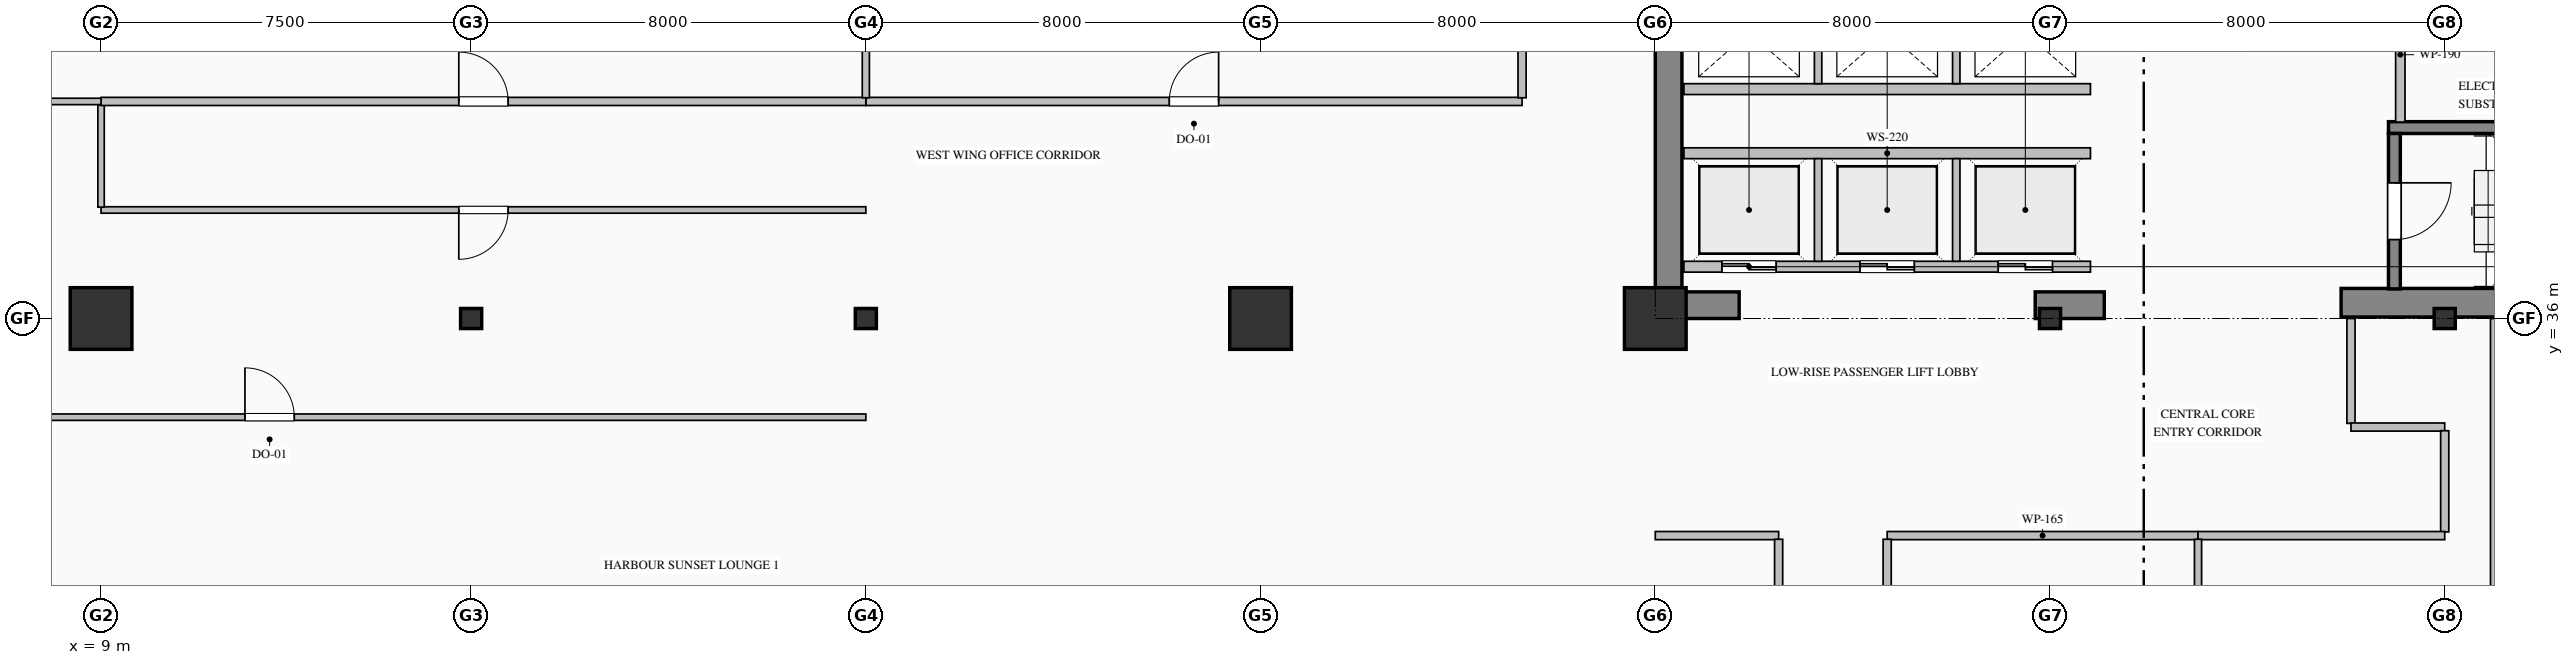
"""IFC4 building model, lengths in metres.
Left out: names, types, materials, properties, quantities, classifications, styles, units other than length and angle.
Written with IfcOpenShell. Run it as: python <this file> out.ifc"""

import sys

from ifc_helpers import new_model, si_unit, direction, frame, frame_2d, origin, origin_2d, place, context, subcontext, project, spatial, rectangle, hollow_rectangle, i_section, extrude, element, fill, save


model = new_model("IFC4")
c1 = context("Model", 3, precision=1e-05, world=origin(), true_north=direction((0.0, 1.0)))
c2 = subcontext(c1, "Body", "Model", "MODEL_VIEW")
j1 = project(units=[si_unit("LENGTHUNIT", "METRE"), si_unit("PLANEANGLEUNIT", "RADIAN")], contexts=[c1])
p1 = place(None, origin())
s1 = spatial("IfcSite", under=j1, at=p1, CompositionType="ELEMENT")
p2 = place(p1, origin())
s2 = spatial("IfcBuilding", under=s1, at=p2, CompositionType="ELEMENT")
p3 = place(p2, frame((0.0, 0.0, 68.2)))
s3 = spatial("IfcBuildingStorey", under=s2, at=p3, CompositionType="ELEMENT", Elevation=68.2)
p4 = place(p3, frame((40.77, 36.54, 0.0), z_axis=(0.0, 0.0, 1.0), x_axis=(0.0, 1.0, 0.0)))
e1 = element("IfcWall", 1, at=p4, inside=s3, PredefinedType="SHEAR", context=c2, shape_type="SweptSolid", body=[
    extrude(rectangle(XDim=7.86, YDim=0.54, at=frame_2d((3.93, 0.0))), origin(), (0.0, 0.0, 1.0), 3.75),
])
p5 = place(p3, frame((40.5, 36.27, 0.0), z_axis=(0.0, 0.0, 1.0), x_axis=(1.0, 0.0, 0.0)))
e2 = element("IfcWall", 2, at=p5, inside=s3, PredefinedType="SHEAR", context=c2, shape_type="SweptSolid", body=[
    extrude(rectangle(XDim=1.7, YDim=0.54, at=frame_2d((0.85, 0.0))), origin(), (0.0, 0.0, 1.0), 3.75),
])
p6 = place(p3, frame((48.2, 36.27, 0.0), z_axis=(0.0, 0.0, 1.0), x_axis=(1.0, 0.0, 0.0)))
e3 = element("IfcWall", 3, at=p6, inside=s3, PredefinedType="SHEAR", context=c2, shape_type="SweptSolid", body=[
    extrude(rectangle(XDim=1.4, YDim=0.54, at=frame_2d((0.7, 0.0))), origin(), (0.0, 0.0, 1.0), 3.75),
])
p7 = place(p3, frame((54.4, 36.32, 0.0), z_axis=(0.0, 0.0, 1.0), x_axis=(1.0, 0.0, 0.0)))
e4 = element("IfcWall", 4, at=p7, inside=s3, PredefinedType="SHEAR", context=c2, shape_type="SweptSolid", body=[
    extrude(rectangle(XDim=9.6, YDim=0.58, at=frame_2d((4.8, 0.0))), origin(), (0.0, 0.0, 1.0), 4.0),
])
p8 = place(p3, frame((9.0, 36.0, 0.0), z_axis=(0.0, 0.0, 1.0), x_axis=(1.0, 0.0, 0.0)))
e5 = element("IfcColumn", 5, at=p8, inside=s3, PredefinedType="COLUMN", context=c2, shape_type="SweptSolid", body=[
    extrude(hollow_rectangle(XDim=1.25, YDim=1.25, WallThickness=0.045, at=origin_2d()), origin(), (0.0, 0.0, 1.0), 4.0),
])
for number, where, z_axis, x_axis in (
    (6, (16.5, 36.0, 0.0), (0.0, 0.0, 1.0), (1.0, 0.0, 0.0)),
    (7, (24.5, 36.0, 0.0), (0.0, 0.0, 1.0), (1.0, 0.0, 0.0)),
):
    element("IfcColumn", number, at=place(p3, frame(where, z_axis=z_axis, x_axis=x_axis)), inside=s3, PredefinedType="COLUMN", context=c2, shape_type="SweptSolid", body=[
        extrude(i_section(OverallWidth=0.407, OverallDepth=0.428, WebThickness=0.02, FlangeThickness=0.035, FilletRadius=0.022, at=origin_2d()), origin(), (0.0, 0.0, 1.0), 4.0),
    ])
for number, where, z_axis, x_axis in (
    (8, (32.5, 36.0, 0.0), (0.0, 0.0, 1.0), (1.0, 0.0, 0.0)),
    (9, (40.5, 36.0, 0.0), (0.0, 0.0, 1.0), (1.0, 0.0, 0.0)),
):
    element("IfcColumn", number, at=place(p3, frame(where, z_axis=z_axis, x_axis=x_axis)), inside=s3, PredefinedType="COLUMN", context=c2, shape_type="SweptSolid", body=[
        extrude(hollow_rectangle(XDim=1.25, YDim=1.25, WallThickness=0.045, at=origin_2d()), origin(), (0.0, 0.0, 1.0), 4.0),
    ])
for number, where, z_axis, x_axis in (
    (10, (48.5, 36.0, 0.0), (0.0, 0.0, 1.0), (1.0, 0.0, 0.0)),
    (11, (56.5, 36.0, 0.0), (0.0, 0.0, 1.0), (1.0, 0.0, 0.0)),
):
    element("IfcColumn", number, at=place(p3, frame(where, z_axis=z_axis, x_axis=x_axis)), inside=s3, PredefinedType="COLUMN", context=c2, shape_type="SweptSolid", body=[
        extrude(i_section(OverallWidth=0.407, OverallDepth=0.428, WebThickness=0.02, FlangeThickness=0.035, FilletRadius=0.022, at=origin_2d()), origin(), (0.0, 0.0, 1.0), 4.0),
    ])
p9 = place(p3, frame((55.36, 39.87, 0.0), z_axis=(0.0, 0.0, 1.0), x_axis=(1.0, 0.0, 0.0)))
e12 = element("IfcWall", 12, at=p9, inside=s3, PredefinedType="SOLIDWALL", context=c2, shape_type="SweptSolid", body=[
    extrude(rectangle(XDim=8.08, YDim=0.24, at=frame_2d((4.04, 0.0))), origin(), (0.0, 0.0, 1.0), 4.0),
])
p10 = place(p3, frame((55.48, 39.75, 0.0), z_axis=(0.0, 0.0, 1.0), x_axis=(0.0, -1.0, 0.0)))
e13 = element("IfcWall", 13, at=p10, inside=s3, PredefinedType="SOLIDWALL", context=c2, shape_type="SweptSolid", body=[
    extrude(rectangle(XDim=3.15, YDim=0.24, at=frame_2d((1.575, 0.0))), origin(), (0.0, 0.0, 1.0), 4.0),
])
p11 = place(p10, frame((1.0, 0.0, 0.0)))
e14 = element("IfcOpeningElement", 14, at=p11, cuts=e13, PredefinedType="OPENING", context=c2, shape_type="SweptSolid", body=[
    extrude(rectangle(XDim=1.15, YDim=2.2, at=frame_2d((0.575, 1.1))), frame((0.0, 0.13, 0.0), z_axis=(0.0, -1.0, 0.0), x_axis=(1.0, 0.0, 0.0)), (0.0, 0.0, 1.0), 0.26),
])
p12 = place(p3, frame((49.32, 37.05, 0.0), z_axis=(0.0, 0.0, 1.0), x_axis=(-1.0, 0.0, 0.0)))
e15 = element("IfcWall", 15, at=p12, inside=s3, PredefinedType="PARTITIONING", context=c2, shape_type="SweptSolid", body=[
    extrude(rectangle(XDim=8.24, YDim=0.22, at=frame_2d((4.12, 0.0))), origin(), (0.0, 0.0, 1.0), 3.75),
])
p13 = place(p12, frame((6.37, 0.0, 0.0)))
e16 = element("IfcOpeningElement", 16, at=p13, cuts=e15, PredefinedType="OPENING", context=c2, shape_type="SweptSolid", body=[
    extrude(rectangle(XDim=1.1, YDim=2.2, at=frame_2d((0.55, 1.1))), frame((0.0, 0.12, 0.0), z_axis=(0.0, -1.0, 0.0), x_axis=(1.0, 0.0, 0.0)), (0.0, 0.0, 1.0), 0.24),
])
p14 = place(p12, frame((3.57, 0.0, 0.0)))
e17 = element("IfcOpeningElement", 17, at=p14, cuts=e15, PredefinedType="OPENING", context=c2, shape_type="SweptSolid", body=[
    extrude(rectangle(XDim=1.1, YDim=2.2, at=frame_2d((0.55, 1.1))), frame((0.0, 0.12, 0.0), z_axis=(0.0, -1.0, 0.0), x_axis=(1.0, 0.0, 0.0)), (0.0, 0.0, 1.0), 0.24),
])
p15 = place(p12, frame((0.77, 0.0, 0.0)))
e18 = element("IfcOpeningElement", 18, at=p15, cuts=e15, PredefinedType="OPENING", context=c2, shape_type="SweptSolid", body=[
    extrude(rectangle(XDim=1.1, YDim=2.2, at=frame_2d((0.55, 1.1))), frame((0.0, 0.12, 0.0), z_axis=(0.0, -1.0, 0.0), x_axis=(1.0, 0.0, 0.0)), (0.0, 0.0, 1.0), 0.24),
])
p16 = place(p3, frame((41.08, 39.35, 0.0), z_axis=(0.0, 0.0, 1.0), x_axis=(1.0, 0.0, 0.0)))
e19 = element("IfcWall", 19, at=p16, inside=s3, PredefinedType="PARTITIONING", context=c2, shape_type="SweptSolid", body=[
    extrude(rectangle(XDim=8.24, YDim=0.22, at=frame_2d((4.12, 0.0))), origin(), (0.0, 0.0, 1.0), 3.75),
])
for number, where, z_axis, x_axis in (
    (20, (43.8, 37.16, 0.0), (0.0, 0.0, 1.0), (0.0, 1.0, 0.0)),
    (21, (46.6, 37.16, 0.0), (0.0, 0.0, 1.0), (0.0, 1.0, 0.0)),
):
    element("IfcWall", number, at=place(p3, frame(where, z_axis=z_axis, x_axis=x_axis)), inside=s3, PredefinedType="PARTITIONING", context=c2, shape_type="SweptSolid", body=[
        extrude(rectangle(XDim=2.08, YDim=0.15, at=frame_2d((1.04, 0.0))), origin(), (0.0, 0.0, 1.0), 3.75),
    ])
p17 = place(p3, frame((49.32, 40.65, 0.0), z_axis=(0.0, 0.0, 1.0), x_axis=(-1.0, 0.0, 0.0)))
e22 = element("IfcWall", 22, at=p17, inside=s3, PredefinedType="PARTITIONING", context=c2, shape_type="SweptSolid", body=[
    extrude(rectangle(XDim=8.24, YDim=0.22, at=frame_2d((4.12, 0.0))), origin(), (0.0, 0.0, 1.0), 3.75),
])
for number, where, z_axis, x_axis in (
    (23, (43.8, 40.76, 0.0), (0.0, 0.0, 1.0), (0.0, 1.0, 0.0)),
    (24, (46.6, 40.76, 0.0), (0.0, 0.0, 1.0), (0.0, 1.0, 0.0)),
):
    element("IfcWall", number, at=place(p3, frame(where, z_axis=z_axis, x_axis=x_axis)), inside=s3, PredefinedType="PARTITIONING", context=c2, shape_type="SweptSolid", body=[
        extrude(rectangle(XDim=2.08, YDim=0.15, at=frame_2d((1.04, 0.0))), origin(), (0.0, 0.0, 1.0), 3.75),
    ])
p18 = place(p3, frame((55.6, 42.713, 0.0), z_axis=(0.0, 0.0, 1.0), x_axis=(0.0, -1.0, 0.0)))
e25 = element("IfcWall", 25, at=p18, inside=s3, PredefinedType="PARTITIONING", context=c2, shape_type="SweptSolid", body=[
    extrude(rectangle(XDim=2.731, YDim=0.19, at=frame_2d((1.365, 0.0))), origin(), (0.0, 0.0, 1.0), 3.75),
])
p19 = place(p3, frame((24.5, 40.4, 0.0), z_axis=(0.0, 0.0, 1.0), x_axis=(1.0, 0.0, 0.0)))
e26 = element("IfcWall", 26, at=p19, inside=s3, PredefinedType="PARTITIONING", context=c2, shape_type="SweptSolid", body=[
    extrude(rectangle(XDim=13.3, YDim=0.165, at=frame_2d((6.65, 0.0))), origin(), (0.0, 0.0, 1.0), 3.75),
])
p20 = place(p19, frame((6.15, 0.0, 0.0)))
e27 = element("IfcOpeningElement", 27, at=p20, cuts=e26, PredefinedType="OPENING", context=c2, shape_type="SweptSolid", body=[
    extrude(rectangle(XDim=1.0, YDim=2.15, at=frame_2d((0.5, 1.075))), frame((0.0, 0.093, 0.0), z_axis=(0.0, -1.0, 0.0), x_axis=(1.0, 0.0, 0.0)), (0.0, 0.0, 1.0), 0.185),
])
p21 = place(p3, frame((24.5, 38.2, 0.0), z_axis=(0.0, 0.0, 1.0), x_axis=(-1.0, 0.0, 0.0)))
e28 = element("IfcWall", 28, at=p21, inside=s3, PredefinedType="PARTITIONING", context=c2, shape_type="SweptSolid", body=[
    extrude(rectangle(XDim=15.5, YDim=0.13, at=frame_2d((7.75, 0.0))), origin(), (0.0, 0.0, 1.0), 3.75),
])
p22 = place(p21, frame((7.25, 0.0, 0.0)))
e29 = element("IfcOpeningElement", 29, at=p22, cuts=e28, PredefinedType="OPENING", context=c2, shape_type="SweptSolid", body=[
    extrude(rectangle(XDim=1.0, YDim=2.15, at=frame_2d((0.5, 1.075))), frame((0.0, 0.075, 0.0), z_axis=(0.0, -1.0, 0.0), x_axis=(1.0, 0.0, 0.0)), (0.0, 0.0, 1.0), 0.15),
])
p23 = place(p3, frame((9.0, 38.257, 0.0), z_axis=(0.0, 0.0, 1.0), x_axis=(0.0, 1.0, 0.0)))
e30 = element("IfcWall", 30, at=p23, inside=s3, PredefinedType="PARTITIONING", context=c2, shape_type="SweptSolid", body=[
    extrude(rectangle(XDim=2.068, YDim=0.13, at=frame_2d((1.034, 0.0))), origin(), (0.0, 0.0, 1.0), 3.042),
])
p24 = place(p3, frame((9.0, 40.4, 0.0), z_axis=(0.0, 0.0, 1.0), x_axis=(1.0, 0.0, 0.0)))
e31 = element("IfcWall", 31, at=p24, inside=s3, PredefinedType="PARTITIONING", context=c2, shape_type="SweptSolid", body=[
    extrude(rectangle(XDim=15.5, YDim=0.165, at=frame_2d((7.75, 0.0))), origin(), (0.0, 0.0, 1.0), 3.75),
])
p25 = place(p24, frame((7.25, 0.0, 0.0)))
e32 = element("IfcOpeningElement", 32, at=p25, cuts=e31, PredefinedType="OPENING", context=c2, shape_type="SweptSolid", body=[
    extrude(rectangle(XDim=1.0, YDim=2.15, at=frame_2d((0.5, 1.075))), frame((0.0, 0.093, 0.0), z_axis=(0.0, -1.0, 0.0), x_axis=(1.0, 0.0, 0.0)), (0.0, 0.0, 1.0), 0.185),
])
p26 = place(p3, frame((37.8, 40.475, 0.0), z_axis=(0.0, 0.0, 1.0), x_axis=(0.0, 1.0, 0.0)))
e33 = element("IfcWall", 33, at=p26, inside=s3, PredefinedType="PARTITIONING", context=c2, shape_type="SweptSolid", body=[
    extrude(rectangle(XDim=3.651, YDim=0.165, at=frame_2d((1.825, 0.0))), origin(), (0.0, 0.0, 1.0), 3.75),
])
p27 = place(p3, frame((51.5, 31.6, 0.0), z_axis=(0.0, 0.0, 1.0), x_axis=(-1.0, 0.0, 0.0)))
e34 = element("IfcWall", 34, at=p27, inside=s3, PredefinedType="PARTITIONING", context=c2, shape_type="SweptSolid", body=[
    extrude(rectangle(XDim=6.3, YDim=0.165, at=frame_2d((3.15, 0.0))), origin(), (0.0, 0.0, 1.0), 3.75),
])
p28 = place(p3, frame((54.6, 36.0, 0.0), z_axis=(0.0, 0.0, 1.0), x_axis=(0.0, -1.0, 0.0)))
e35 = element("IfcWall", 35, at=p28, inside=s3, PredefinedType="PARTITIONING", context=c2, shape_type="SweptSolid", body=[
    extrude(rectangle(XDim=2.125, YDim=0.165, at=frame_2d((1.063, 0.0))), origin(), (0.0, 0.0, 1.0), 3.75),
])
p29 = place(p3, frame((54.6, 33.8, 0.0), z_axis=(0.0, 0.0, 1.0), x_axis=(1.0, 0.0, 0.0)))
e36 = element("IfcWall", 36, at=p29, inside=s3, PredefinedType="PARTITIONING", context=c2, shape_type="SweptSolid", body=[
    extrude(rectangle(XDim=1.9, YDim=0.165, at=frame_2d((0.95, 0.0))), origin(), (0.0, 0.0, 1.0), 3.75),
])
p30 = place(p3, frame((56.5, 33.726, 0.0), z_axis=(0.0, 0.0, 1.0), x_axis=(0.0, -1.0, 0.0)))
e37 = element("IfcWall", 37, at=p30, inside=s3, PredefinedType="PARTITIONING", context=c2, shape_type="SweptSolid", body=[
    extrude(rectangle(XDim=2.051, YDim=0.165, at=frame_2d((1.025, 0.0))), origin(), (0.0, 0.0, 1.0), 3.042),
])
p31 = place(p3, frame((56.5, 31.6, 0.0), z_axis=(0.0, 0.0, 1.0), x_axis=(-1.0, 0.0, 0.0)))
e38 = element("IfcWall", 38, at=p31, inside=s3, PredefinedType="PARTITIONING", context=c2, shape_type="SweptSolid", body=[
    extrude(rectangle(XDim=5.0, YDim=0.165, at=frame_2d((2.5, 0.0))), origin(), (0.0, 0.0, 1.0), 3.75),
])
p32 = place(p3, frame((43.0, 31.6, 0.0), z_axis=(0.0, 0.0, 1.0), x_axis=(-1.0, 0.0, 0.0)))
e39 = element("IfcWall", 39, at=p32, inside=s3, PredefinedType="PARTITIONING", context=c2, shape_type="SweptSolid", body=[
    extrude(rectangle(XDim=2.5, YDim=0.165, at=frame_2d((1.25, 0.0))), origin(), (0.0, 0.0, 1.0), 3.75),
])
p33 = place(p3, frame((45.2, 31.525, 0.0), z_axis=(0.0, 0.0, 1.0), x_axis=(0.0, -1.0, 0.0)))
e40 = element("IfcWall", 40, at=p33, inside=s3, PredefinedType="PARTITIONING", context=c2, shape_type="SweptSolid", body=[
    extrude(rectangle(XDim=16.751, YDim=0.165, at=frame_2d((8.375, 0.0))), origin(), (0.0, 0.0, 1.0), 3.75),
])
p34 = place(p33, frame((7.875, 0.0, 0.0)))
e41 = element("IfcOpeningElement", 41, at=p34, cuts=e40, PredefinedType="OPENING", context=c2, shape_type="SweptSolid", body=[
    extrude(rectangle(XDim=1.0, YDim=2.15, at=frame_2d((0.5, 1.075))), frame((0.0, 0.093, 0.0), z_axis=(0.0, -1.0, 0.0), x_axis=(1.0, 0.0, 0.0)), (0.0, 0.0, 1.0), 0.185),
])
p35 = place(p3, frame((43.0, 22.057, 0.0), z_axis=(0.0, 0.0, 1.0), x_axis=(0.0, 1.0, 0.0)))
e42 = element("IfcWall", 42, at=p35, inside=s3, PredefinedType="PARTITIONING", context=c2, shape_type="SweptSolid", body=[
    extrude(rectangle(XDim=9.469, YDim=0.165, at=frame_2d((4.734, 0.0))), origin(), (0.0, 0.0, 1.0), 3.75),
])
p36 = place(p35, frame((4.234, 0.0, 0.0)))
e43 = element("IfcOpeningElement", 43, at=p36, cuts=e42, PredefinedType="OPENING", context=c2, shape_type="SweptSolid", body=[
    extrude(rectangle(XDim=1.0, YDim=2.15, at=frame_2d((0.5, 1.075))), frame((0.0, 0.093, 0.0), z_axis=(0.0, -1.0, 0.0), x_axis=(1.0, 0.0, 0.0)), (0.0, 0.0, 1.0), 0.185),
])
p37 = place(p3, frame((24.5, 40.475, 0.0), z_axis=(0.0, 0.0, 1.0), x_axis=(0.0, 1.0, 0.0)))
e44 = element("IfcWall", 44, at=p37, inside=s3, PredefinedType="PARTITIONING", context=c2, shape_type="SweptSolid", body=[
    extrude(rectangle(XDim=5.461, YDim=0.145, at=frame_2d((2.73, 0.0))), origin(), (0.0, 0.0, 1.0), 3.042),
])
p38 = place(p3, frame((0.332, 34.0, 0.0), z_axis=(0.0, 0.0, 1.0), x_axis=(1.0, 0.0, 0.0)))
e45 = element("IfcWall", 45, at=p38, inside=s3, PredefinedType="PARTITIONING", context=c2, shape_type="SweptSolid", body=[
    extrude(rectangle(XDim=24.168, YDim=0.13, at=frame_2d((12.084, 0.0))), origin(), (0.0, 0.0, 1.0), 3.75),
])
p39 = place(p38, frame((11.584, 0.0, 0.0)))
e46 = element("IfcOpeningElement", 46, at=p39, cuts=e45, PredefinedType="OPENING", context=c2, shape_type="SweptSolid", body=[
    extrude(rectangle(XDim=1.0, YDim=2.15, at=frame_2d((0.5, 1.075))), frame((0.0, 0.075, 0.0), z_axis=(0.0, -1.0, 0.0), x_axis=(1.0, 0.0, 0.0)), (0.0, 0.0, 1.0), 0.15),
])
p40 = place(p3, frame((0.332, 40.4, 0.0), z_axis=(0.0, 0.0, 1.0), x_axis=(1.0, 0.0, 0.0)))
e47 = element("IfcWall", 47, at=p40, inside=s3, PredefinedType="PARTITIONING", context=c2, shape_type="SweptSolid", body=[
    extrude(rectangle(XDim=8.668, YDim=0.13, at=frame_2d((4.334, 0.0))), origin(), (0.0, 0.0, 1.0), 3.75),
])
p41 = place(p3, frame((51.5, 31.525, 0.0), z_axis=(0.0, 0.0, 1.0), x_axis=(0.0, -1.0, 0.0)))
e48 = element("IfcWall", 48, at=p41, inside=s3, PredefinedType="PARTITIONING", context=c2, shape_type="SweptSolid", body=[
    extrude(rectangle(XDim=16.751, YDim=0.145, at=frame_2d((8.375, 0.0))), origin(), (0.0, 0.0, 1.0), 3.75),
])
p42 = place(p3, frame((57.5, 36.0, 0.0), z_axis=(0.0, 0.0, 1.0), x_axis=(0.0, -1.0, 0.0)))
e49 = element("IfcWall", 49, at=p42, inside=s3, PredefinedType="PARTITIONING", context=c2, shape_type="SweptSolid", body=[
    extrude(rectangle(XDim=21.226, YDim=0.145, at=frame_2d((10.613, 0.0))), origin(), (0.0, 0.0, 1.0), 3.75),
])
p43 = place(p11, origin())
e50 = element("IfcDoor", 50, at=p43, inside=s3, OperationType="SINGLE_SWING_LEFT", PredefinedType="DOOR", context=c2, shape_type="SweptSolid", body=[
    extrude(rectangle(XDim=1.15, YDim=2.2, at=frame_2d((0.575, 1.1))), frame((0.0, 0.025, 0.0), z_axis=(0.0, -1.0, 0.0), x_axis=(1.0, 0.0, 0.0)), (0.0, 0.0, 1.0), 0.05),
])
fill(e14, e50)
p44 = place(p13, origin())
e51 = element("IfcDoor", 51, at=p44, inside=s3, OperationType="DOUBLE_DOOR_SLIDING", PredefinedType="DOOR", context=c2, shape_type="SweptSolid", body=[
    extrude(rectangle(XDim=1.1, YDim=2.2, at=frame_2d((0.55, 1.1))), frame((0.0, 0.025, 0.0), z_axis=(0.0, -1.0, 0.0), x_axis=(1.0, 0.0, 0.0)), (0.0, 0.0, 1.0), 0.05),
])
fill(e16, e51)
p45 = place(p14, origin())
e52 = element("IfcDoor", 52, at=p45, inside=s3, OperationType="DOUBLE_DOOR_SLIDING", PredefinedType="DOOR", context=c2, shape_type="SweptSolid", body=[
    extrude(rectangle(XDim=1.1, YDim=2.2, at=frame_2d((0.55, 1.1))), frame((0.0, 0.025, 0.0), z_axis=(0.0, -1.0, 0.0), x_axis=(1.0, 0.0, 0.0)), (0.0, 0.0, 1.0), 0.05),
])
fill(e17, e52)
p46 = place(p15, origin())
e53 = element("IfcDoor", 53, at=p46, inside=s3, OperationType="DOUBLE_DOOR_SLIDING", PredefinedType="DOOR", context=c2, shape_type="SweptSolid", body=[
    extrude(rectangle(XDim=1.1, YDim=2.2, at=frame_2d((0.55, 1.1))), frame((0.0, 0.025, 0.0), z_axis=(0.0, -1.0, 0.0), x_axis=(1.0, 0.0, 0.0)), (0.0, 0.0, 1.0), 0.05),
])
fill(e18, e53)
p47 = place(p20, origin())
e54 = element("IfcDoor", 54, at=p47, inside=s3, OperationType="SINGLE_SWING_RIGHT", PredefinedType="DOOR", context=c2, shape_type="SweptSolid", body=[
    extrude(rectangle(XDim=1.0, YDim=2.15, at=frame_2d((0.5, 1.075))), frame((0.0, 0.025, 0.0), z_axis=(0.0, -1.0, 0.0), x_axis=(1.0, 0.0, 0.0)), (0.0, 0.0, 1.0), 0.05),
])
fill(e27, e54)
p48 = place(p39, origin())
e55 = element("IfcDoor", 55, at=p48, inside=s3, OperationType="SINGLE_SWING_LEFT", PredefinedType="DOOR", context=c2, shape_type="SweptSolid", body=[
    extrude(rectangle(XDim=1.0, YDim=2.15, at=frame_2d((0.5, 1.075))), frame((0.0, 0.025, 0.0), z_axis=(0.0, -1.0, 0.0), x_axis=(1.0, 0.0, 0.0)), (0.0, 0.0, 1.0), 0.05),
])
fill(e46, e55)
p49 = place(p22, origin())
e56 = element("IfcDoor", 56, at=p49, inside=s3, OperationType="SINGLE_SWING_RIGHT", PredefinedType="DOOR", context=c2, shape_type="SweptSolid", body=[
    extrude(rectangle(XDim=1.0, YDim=2.15, at=frame_2d((0.5, 1.075))), frame((0.0, 0.025, 0.0), z_axis=(0.0, -1.0, 0.0), x_axis=(1.0, 0.0, 0.0)), (0.0, 0.0, 1.0), 0.05),
])
fill(e29, e56)
p50 = place(p25, origin())
e57 = element("IfcDoor", 57, at=p50, inside=s3, OperationType="SINGLE_SWING_LEFT", PredefinedType="DOOR", context=c2, shape_type="SweptSolid", body=[
    extrude(rectangle(XDim=1.0, YDim=2.15, at=frame_2d((0.5, 1.075))), frame((0.0, 0.025, 0.0), z_axis=(0.0, -1.0, 0.0), x_axis=(1.0, 0.0, 0.0)), (0.0, 0.0, 1.0), 0.05),
])
fill(e32, e57)
save(model, sys.argv[1])
